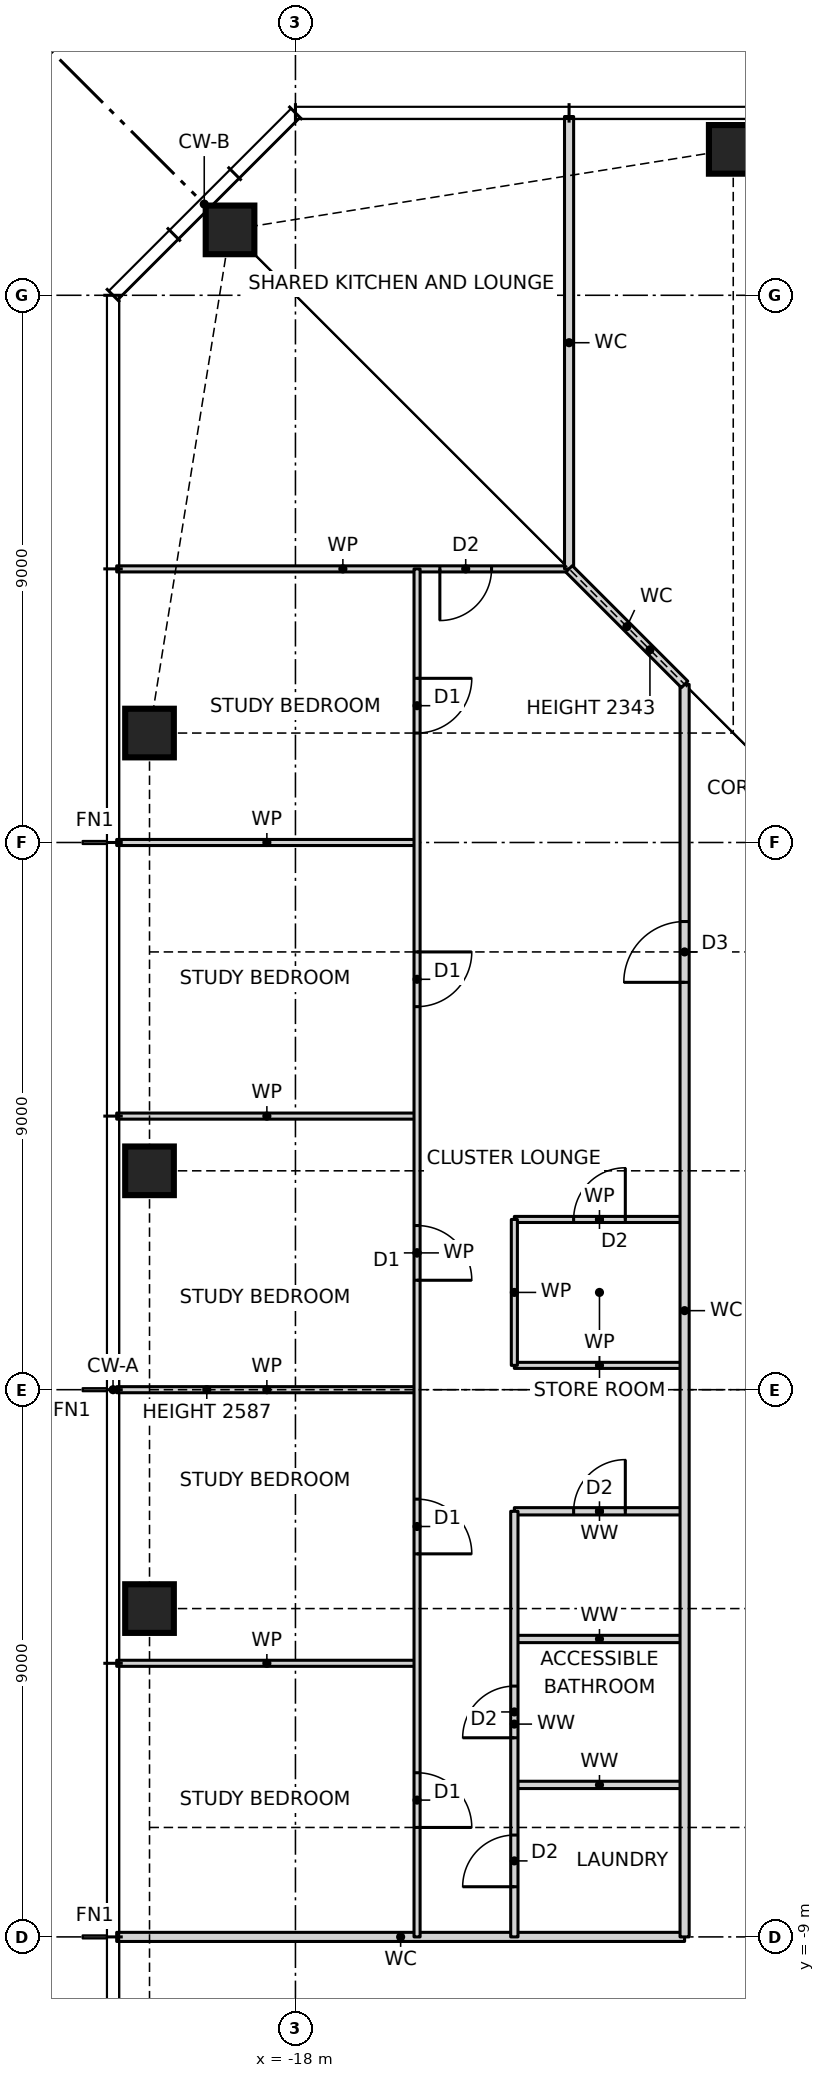
"""IFC4 building model, lengths in metres.
Left out: names, types, materials, properties, quantities, classifications, styles, units other than length and angle.
Written with IfcOpenShell. Run it as: python <this file> out.ifc"""

import sys

from ifc_helpers import new_model, si_unit, direction, frame, frame_2d, origin, origin_2d, place, context, subcontext, project, spatial, rectangle, hollow_rectangle, extrude, element, fill, save


model = new_model("IFC4")
c1 = context("Model", 3, precision=1e-05, world=origin(), true_north=direction((0.0, 1.0)))
c2 = subcontext(c1, "Body", "Model", "MODEL_VIEW")
j1 = project(units=[si_unit("LENGTHUNIT", "METRE"), si_unit("PLANEANGLEUNIT", "RADIAN")], contexts=[c1])
p1 = place(None, origin())
s1 = spatial("IfcSite", under=j1, at=p1, CompositionType="ELEMENT")
p2 = place(p1, origin())
s2 = spatial("IfcBuilding", under=s1, at=p2, CompositionType="ELEMENT")
p3 = place(p2, frame((0.0, 0.0, 129.5)))
s3 = spatial("IfcBuildingStorey", under=s2, at=p3, CompositionType="ELEMENT", Elevation=129.5)
for number, where, z_axis, x_axis in (
    (1, (-10.8, 20.4, 0.0), (0.0, 0.0, 1.0), (1.0, 0.0, 0.0)),
    (2, (-19.076, 19.076, 0.0), (0.0, 0.0, 1.0), (1.0, 0.0, 0.0)),
    (3, (-20.4, 10.8, 0.0), (0.0, 0.0, 1.0), (1.0, 0.0, 0.0)),
    (4, (-20.4, 3.6, 0.0), (0.0, 0.0, 1.0), (1.0, 0.0, 0.0)),
    (5, (-20.4, -3.6, 0.0), (0.0, 0.0, 1.0), (1.0, 0.0, 0.0)),
):
    element("IfcColumn", number, at=place(p3, frame(where, z_axis=z_axis, x_axis=x_axis)), inside=s3, PredefinedType="COLUMN", context=c2, shape_type="SweptSolid", body=[
        extrude(hollow_rectangle(XDim=0.8, YDim=0.8, WallThickness=0.07, at=origin_2d()), origin(), (0.0, 0.0, 1.0), 3.5),
    ])
p4 = place(p3, frame((-20.94, -9.0, 0.0), z_axis=(0.0, 0.0, 1.0), x_axis=(1.0, 0.0, 0.0)))
e6 = element("IfcWall", 6, at=p4, inside=s3, PredefinedType="PARTITIONING", context=c2, shape_type="SweptSolid", body=[
    extrude(rectangle(XDim=9.34, YDim=0.15, at=frame_2d((4.67, 0.0))), origin(), (0.0, 0.0, 1.0), 3.27),
])
p5 = place(p3, frame((-14.4, -6.5, 0.0), z_axis=(0.0, 0.0, 1.0), x_axis=(1.0, 0.0, 0.0)))
e7 = element("IfcWall", 7, at=p5, inside=s3, PredefinedType="PARTITIONING", context=c2, shape_type="SweptSolid", body=[
    extrude(rectangle(XDim=2.8, YDim=0.12, at=frame_2d((1.4, 0.0))), origin(), (0.0, 0.0, 1.0), 3.27),
])
p6 = place(p3, frame((-20.94, -4.5, 0.0), z_axis=(0.0, 0.0, 1.0), x_axis=(1.0, 0.0, 0.0)))
e8 = element("IfcWall", 8, at=p6, inside=s3, PredefinedType="PARTITIONING", context=c2, shape_type="SweptSolid", body=[
    extrude(rectangle(XDim=4.94, YDim=0.1, at=frame_2d((2.47, 0.0))), origin(), (0.0, 0.0, 1.0), 3.27),
])
p7 = place(p3, frame((-14.4, -4.1, 0.0), z_axis=(0.0, 0.0, 1.0), x_axis=(1.0, 0.0, 0.0)))
e9 = element("IfcWall", 9, at=p7, inside=s3, PredefinedType="PARTITIONING", context=c2, shape_type="SweptSolid", body=[
    extrude(rectangle(XDim=2.8, YDim=0.12, at=frame_2d((1.4, 0.0))), origin(), (0.0, 0.0, 1.0), 3.27),
])
p8 = place(p3, frame((-14.4, -2.0, 0.0), z_axis=(0.0, 0.0, 1.0), x_axis=(1.0, 0.0, 0.0)))
e10 = element("IfcWall", 10, at=p8, inside=s3, PredefinedType="PARTITIONING", context=c2, shape_type="SweptSolid", body=[
    extrude(rectangle(XDim=2.8, YDim=0.12, at=frame_2d((1.4, 0.0))), origin(), (0.0, 0.0, 1.0), 3.27),
])
p9 = place(p8, frame((0.975, 0.0, 0.0)))
e11 = element("IfcOpeningElement", 11, at=p9, cuts=e10, PredefinedType="OPENING", context=c2, shape_type="SweptSolid", body=[
    extrude(rectangle(XDim=0.85, YDim=2.1, at=frame_2d((0.425, 1.05))), frame((0.0, 0.07, 0.0), z_axis=(0.0, -1.0, 0.0), x_axis=(1.0, 0.0, 0.0)), (0.0, 0.0, 1.0), 0.14),
])
p10 = place(p3, frame((-20.94, 0.0, 0.0), z_axis=(0.0, 0.0, 1.0), x_axis=(1.0, 0.0, 0.0)))
e12 = element("IfcWall", 12, at=p10, inside=s3, PredefinedType="PARTITIONING", context=c2, shape_type="SweptSolid", body=[
    extrude(rectangle(XDim=4.94, YDim=0.1, at=frame_2d((2.47, 0.0))), origin(), (0.0, 0.0, 1.0), 2.587),
])
p11 = place(p3, frame((-14.4, 0.4, 0.0), z_axis=(0.0, 0.0, 1.0), x_axis=(1.0, 0.0, 0.0)))
e13 = element("IfcWall", 13, at=p11, inside=s3, PredefinedType="PARTITIONING", context=c2, shape_type="SweptSolid", body=[
    extrude(rectangle(XDim=2.8, YDim=0.1, at=frame_2d((1.4, 0.0))), origin(), (0.0, 0.0, 1.0), 3.27),
])
p12 = place(p3, frame((-14.4, 2.8, 0.0), z_axis=(0.0, 0.0, 1.0), x_axis=(1.0, 0.0, 0.0)))
e14 = element("IfcWall", 14, at=p12, inside=s3, PredefinedType="PARTITIONING", context=c2, shape_type="SweptSolid", body=[
    extrude(rectangle(XDim=2.8, YDim=0.1, at=frame_2d((1.4, 0.0))), origin(), (0.0, 0.0, 1.0), 3.27),
])
p13 = place(p12, frame((0.975, 0.0, 0.0)))
e15 = element("IfcOpeningElement", 15, at=p13, cuts=e14, PredefinedType="OPENING", context=c2, shape_type="SweptSolid", body=[
    extrude(rectangle(XDim=0.85, YDim=2.1, at=frame_2d((0.425, 1.05))), frame((0.0, 0.06, 0.0), z_axis=(0.0, -1.0, 0.0), x_axis=(1.0, 0.0, 0.0)), (0.0, 0.0, 1.0), 0.12),
])
for number, where, z_axis, x_axis in (
    (16, (-20.94, 4.5, 0.0), (0.0, 0.0, 1.0), (1.0, 0.0, 0.0)),
    (17, (-20.94, 9.0, 0.0), (0.0, 0.0, 1.0), (1.0, 0.0, 0.0)),
):
    element("IfcWall", number, at=place(p3, frame(where, z_axis=z_axis, x_axis=x_axis)), inside=s3, PredefinedType="PARTITIONING", context=c2, shape_type="SweptSolid", body=[
        extrude(rectangle(XDim=4.94, YDim=0.1, at=frame_2d((2.47, 0.0))), origin(), (0.0, 0.0, 1.0), 3.27),
    ])
p14 = place(p3, frame((-20.94, 13.5, 0.0), z_axis=(0.0, 0.0, 1.0), x_axis=(1.0, 0.0, 0.0)))
e18 = element("IfcWall", 18, at=p14, inside=s3, PredefinedType="PARTITIONING", context=c2, shape_type="SweptSolid", body=[
    extrude(rectangle(XDim=7.44, YDim=0.1, at=frame_2d((3.72, 0.0))), origin(), (0.0, 0.0, 1.0), 3.27),
])
p15 = place(p14, frame((5.315, 0.0, 0.0)))
e19 = element("IfcOpeningElement", 19, at=p15, cuts=e18, PredefinedType="OPENING", context=c2, shape_type="SweptSolid", body=[
    extrude(rectangle(XDim=0.85, YDim=2.1, at=frame_2d((0.425, 1.05))), frame((0.0, 0.06, 0.0), z_axis=(0.0, -1.0, 0.0), x_axis=(1.0, 0.0, 0.0)), (0.0, 0.0, 1.0), 0.12),
])
p16 = place(p3, frame((-11.6, -9.0, 0.0), z_axis=(0.0, 0.0, 1.0), x_axis=(0.0, 1.0, 0.0)))
e20 = element("IfcWall", 20, at=p16, inside=s3, PredefinedType="PARTITIONING", context=c2, shape_type="SweptSolid", body=[
    extrude(rectangle(XDim=20.6, YDim=0.15, at=frame_2d((10.3, 0.0))), origin(), (0.0, 0.0, 1.0), 3.27),
])
p17 = place(p16, frame((15.7, 0.0, 0.0)))
e21 = element("IfcOpeningElement", 21, at=p17, cuts=e20, PredefinedType="OPENING", context=c2, shape_type="SweptSolid", body=[
    extrude(rectangle(XDim=1.0, YDim=2.1, at=frame_2d((0.5, 1.05))), frame((0.0, 0.085, 0.0), z_axis=(0.0, -1.0, 0.0), x_axis=(1.0, 0.0, 0.0)), (0.0, 0.0, 1.0), 0.17),
])
p18 = place(p3, frame((-13.5, 13.5, 0.0), z_axis=(0.0, 0.0, 1.0), x_axis=(0.0, 1.0, 0.0)))
e22 = element("IfcWall", 22, at=p18, inside=s3, PredefinedType="PARTITIONING", context=c2, shape_type="SweptSolid", body=[
    extrude(rectangle(XDim=7.44, YDim=0.15, at=frame_2d((3.72, 0.0))), origin(), (0.0, 0.0, 1.0), 3.27),
])
p19 = place(p3, frame((-14.4, -9.0, 0.0), z_axis=(0.0, 0.0, 1.0), x_axis=(0.0, 1.0, 0.0)))
e23 = element("IfcWall", 23, at=p19, inside=s3, PredefinedType="PARTITIONING", context=c2, shape_type="SweptSolid", body=[
    extrude(rectangle(XDim=7.0, YDim=0.12, at=frame_2d((3.5, 0.0))), origin(), (0.0, 0.0, 1.0), 3.27),
])
p20 = place(p19, frame((3.275, 0.0, 0.0)))
e24 = element("IfcOpeningElement", 24, at=p20, cuts=e23, PredefinedType="OPENING", context=c2, shape_type="SweptSolid", body=[
    extrude(rectangle(XDim=0.85, YDim=2.1, at=frame_2d((0.425, 1.05))), frame((0.0, 0.07, 0.0), z_axis=(0.0, -1.0, 0.0), x_axis=(1.0, 0.0, 0.0)), (0.0, 0.0, 1.0), 0.14),
])
p21 = place(p19, frame((0.825, 0.0, 0.0)))
e25 = element("IfcOpeningElement", 25, at=p21, cuts=e23, PredefinedType="OPENING", context=c2, shape_type="SweptSolid", body=[
    extrude(rectangle(XDim=0.85, YDim=2.1, at=frame_2d((0.425, 1.05))), frame((0.0, 0.07, 0.0), z_axis=(0.0, -1.0, 0.0), x_axis=(1.0, 0.0, 0.0)), (0.0, 0.0, 1.0), 0.14),
])
p22 = place(p3, frame((-14.4, 0.4, 0.0), z_axis=(0.0, 0.0, 1.0), x_axis=(0.0, 1.0, 0.0)))
e26 = element("IfcWall", 26, at=p22, inside=s3, PredefinedType="PARTITIONING", context=c2, shape_type="SweptSolid", body=[
    extrude(rectangle(XDim=2.4, YDim=0.1, at=frame_2d((1.2, 0.0))), origin(), (0.0, 0.0, 1.0), 3.27),
])
p23 = place(p3, frame((-16.0, -9.0, 0.0), z_axis=(0.0, 0.0, 1.0), x_axis=(0.0, 1.0, 0.0)))
e27 = element("IfcWall", 27, at=p23, inside=s3, PredefinedType="PARTITIONING", context=c2, shape_type="SweptSolid", body=[
    extrude(rectangle(XDim=22.5, YDim=0.1, at=frame_2d((11.25, 0.0))), origin(), (0.0, 0.0, 1.0), 3.27),
])
p24 = place(p23, frame((19.8, 0.0, 0.0)))
e28 = element("IfcOpeningElement", 28, at=p24, cuts=e27, PredefinedType="OPENING", context=c2, shape_type="SweptSolid", body=[
    extrude(rectangle(XDim=0.9, YDim=2.1, at=frame_2d((0.45, 1.05))), frame((0.0, 0.06, 0.0), z_axis=(0.0, -1.0, 0.0), x_axis=(1.0, 0.0, 0.0)), (0.0, 0.0, 1.0), 0.12),
])
p25 = place(p23, frame((15.3, 0.0, 0.0)))
e29 = element("IfcOpeningElement", 29, at=p25, cuts=e27, PredefinedType="OPENING", context=c2, shape_type="SweptSolid", body=[
    extrude(rectangle(XDim=0.9, YDim=2.1, at=frame_2d((0.45, 1.05))), frame((0.0, 0.06, 0.0), z_axis=(0.0, -1.0, 0.0), x_axis=(1.0, 0.0, 0.0)), (0.0, 0.0, 1.0), 0.12),
])
p26 = place(p23, frame((10.8, 0.0, 0.0)))
e30 = element("IfcOpeningElement", 30, at=p26, cuts=e27, PredefinedType="OPENING", context=c2, shape_type="SweptSolid", body=[
    extrude(rectangle(XDim=0.9, YDim=2.1, at=frame_2d((0.45, 1.05))), frame((0.0, 0.06, 0.0), z_axis=(0.0, -1.0, 0.0), x_axis=(1.0, 0.0, 0.0)), (0.0, 0.0, 1.0), 0.12),
])
p27 = place(p23, frame((6.3, 0.0, 0.0)))
e31 = element("IfcOpeningElement", 31, at=p27, cuts=e27, PredefinedType="OPENING", context=c2, shape_type="SweptSolid", body=[
    extrude(rectangle(XDim=0.9, YDim=2.1, at=frame_2d((0.45, 1.05))), frame((0.0, 0.06, 0.0), z_axis=(0.0, -1.0, 0.0), x_axis=(1.0, 0.0, 0.0)), (0.0, 0.0, 1.0), 0.12),
])
p28 = place(p23, frame((1.8, 0.0, 0.0)))
e32 = element("IfcOpeningElement", 32, at=p28, cuts=e27, PredefinedType="OPENING", context=c2, shape_type="SweptSolid", body=[
    extrude(rectangle(XDim=0.9, YDim=2.1, at=frame_2d((0.45, 1.05))), frame((0.0, 0.06, 0.0), z_axis=(0.0, -1.0, 0.0), x_axis=(1.0, 0.0, 0.0)), (0.0, 0.0, 1.0), 0.12),
])
p29 = place(p3, frame((-11.6, 11.6, 0.0), z_axis=(0.0, 0.0, 1.0), x_axis=(-0.707106781187, 0.707106781187, 0.0)))
e33 = element("IfcWall", 33, at=p29, inside=s3, PredefinedType="PARTITIONING", context=c2, shape_type="SweptSolid", body=[
    extrude(rectangle(XDim=2.687, YDim=0.15, at=frame_2d((1.343, 0.0))), origin(), (0.0, 0.0, 1.0), 2.343),
])
p30 = place(p24, frame((0.9, 0.0, 0.0), z_axis=(0.0, 0.0, 1.0), x_axis=(-1.0, 0.0, 0.0)))
e34 = element("IfcDoor", 34, at=p30, inside=s3, OperationType="SINGLE_SWING_LEFT", PredefinedType="DOOR", context=c2, shape_type="SweptSolid", body=[
    extrude(rectangle(XDim=0.9, YDim=2.1, at=frame_2d((0.45, 1.05))), frame((0.0, 0.025, 0.0), z_axis=(0.0, -1.0, 0.0), x_axis=(1.0, 0.0, 0.0)), (0.0, 0.0, 1.0), 0.05),
])
fill(e28, e34)
p31 = place(p25, frame((0.9, 0.0, 0.0), z_axis=(0.0, 0.0, 1.0), x_axis=(-1.0, 0.0, 0.0)))
e35 = element("IfcDoor", 35, at=p31, inside=s3, OperationType="SINGLE_SWING_LEFT", PredefinedType="DOOR", context=c2, shape_type="SweptSolid", body=[
    extrude(rectangle(XDim=0.9, YDim=2.1, at=frame_2d((0.45, 1.05))), frame((0.0, 0.025, 0.0), z_axis=(0.0, -1.0, 0.0), x_axis=(1.0, 0.0, 0.0)), (0.0, 0.0, 1.0), 0.05),
])
fill(e29, e35)
p32 = place(p26, frame((0.9, 0.0, 0.0), z_axis=(0.0, 0.0, 1.0), x_axis=(-1.0, 0.0, 0.0)))
e36 = element("IfcDoor", 36, at=p32, inside=s3, OperationType="SINGLE_SWING_RIGHT", PredefinedType="DOOR", context=c2, shape_type="SweptSolid", body=[
    extrude(rectangle(XDim=0.9, YDim=2.1, at=frame_2d((0.45, 1.05))), frame((0.0, 0.025, 0.0), z_axis=(0.0, -1.0, 0.0), x_axis=(1.0, 0.0, 0.0)), (0.0, 0.0, 1.0), 0.05),
])
fill(e30, e36)
p33 = place(p27, frame((0.9, 0.0, 0.0), z_axis=(0.0, 0.0, 1.0), x_axis=(-1.0, 0.0, 0.0)))
e37 = element("IfcDoor", 37, at=p33, inside=s3, OperationType="SINGLE_SWING_RIGHT", PredefinedType="DOOR", context=c2, shape_type="SweptSolid", body=[
    extrude(rectangle(XDim=0.9, YDim=2.1, at=frame_2d((0.45, 1.05))), frame((0.0, 0.025, 0.0), z_axis=(0.0, -1.0, 0.0), x_axis=(1.0, 0.0, 0.0)), (0.0, 0.0, 1.0), 0.05),
])
fill(e31, e37)
p34 = place(p28, frame((0.9, 0.0, 0.0), z_axis=(0.0, 0.0, 1.0), x_axis=(-1.0, 0.0, 0.0)))
e38 = element("IfcDoor", 38, at=p34, inside=s3, OperationType="SINGLE_SWING_RIGHT", PredefinedType="DOOR", context=c2, shape_type="SweptSolid", body=[
    extrude(rectangle(XDim=0.9, YDim=2.1, at=frame_2d((0.45, 1.05))), frame((0.0, 0.025, 0.0), z_axis=(0.0, -1.0, 0.0), x_axis=(1.0, 0.0, 0.0)), (0.0, 0.0, 1.0), 0.05),
])
fill(e32, e38)
p35 = place(p17, origin())
e39 = element("IfcDoor", 39, at=p35, inside=s3, OperationType="SINGLE_SWING_LEFT", PredefinedType="DOOR", context=c2, shape_type="SweptSolid", body=[
    extrude(rectangle(XDim=1.0, YDim=2.1, at=frame_2d((0.5, 1.05))), frame((0.0, 0.025, 0.0), z_axis=(0.0, -1.0, 0.0), x_axis=(1.0, 0.0, 0.0)), (0.0, 0.0, 1.0), 0.05),
])
fill(e21, e39)
p36 = place(p13, origin())
e40 = element("IfcDoor", 40, at=p36, inside=s3, OperationType="SINGLE_SWING_RIGHT", PredefinedType="DOOR", context=c2, shape_type="SweptSolid", body=[
    extrude(rectangle(XDim=0.85, YDim=2.1, at=frame_2d((0.425, 1.05))), frame((0.0, 0.025, 0.0), z_axis=(0.0, -1.0, 0.0), x_axis=(1.0, 0.0, 0.0)), (0.0, 0.0, 1.0), 0.05),
])
fill(e15, e40)
p37 = place(p9, origin())
e41 = element("IfcDoor", 41, at=p37, inside=s3, OperationType="SINGLE_SWING_RIGHT", PredefinedType="DOOR", context=c2, shape_type="SweptSolid", body=[
    extrude(rectangle(XDim=0.85, YDim=2.1, at=frame_2d((0.425, 1.05))), frame((0.0, 0.025, 0.0), z_axis=(0.0, -1.0, 0.0), x_axis=(1.0, 0.0, 0.0)), (0.0, 0.0, 1.0), 0.05),
])
fill(e11, e41)
p38 = place(p20, origin())
e42 = element("IfcDoor", 42, at=p38, inside=s3, OperationType="SINGLE_SWING_LEFT", PredefinedType="DOOR", context=c2, shape_type="SweptSolid", body=[
    extrude(rectangle(XDim=0.85, YDim=2.1, at=frame_2d((0.425, 1.05))), frame((0.0, 0.025, 0.0), z_axis=(0.0, -1.0, 0.0), x_axis=(1.0, 0.0, 0.0)), (0.0, 0.0, 1.0), 0.05),
])
fill(e24, e42)
p39 = place(p21, origin())
e43 = element("IfcDoor", 43, at=p39, inside=s3, OperationType="SINGLE_SWING_LEFT", PredefinedType="DOOR", context=c2, shape_type="SweptSolid", body=[
    extrude(rectangle(XDim=0.85, YDim=2.1, at=frame_2d((0.425, 1.05))), frame((0.0, 0.025, 0.0), z_axis=(0.0, -1.0, 0.0), x_axis=(1.0, 0.0, 0.0)), (0.0, 0.0, 1.0), 0.05),
])
fill(e25, e43)
p40 = place(p15, frame((0.85, 0.0, 0.0), z_axis=(0.0, 0.0, 1.0), x_axis=(-1.0, 0.0, 0.0)))
e44 = element("IfcDoor", 44, at=p40, inside=s3, OperationType="SINGLE_SWING_RIGHT", PredefinedType="DOOR", context=c2, shape_type="SweptSolid", body=[
    extrude(rectangle(XDim=0.85, YDim=2.1, at=frame_2d((0.425, 1.05))), frame((0.0, 0.025, 0.0), z_axis=(0.0, -1.0, 0.0), x_axis=(1.0, 0.0, 0.0)), (0.0, 0.0, 1.0), 0.05),
])
fill(e19, e44)
save(model, sys.argv[1])
